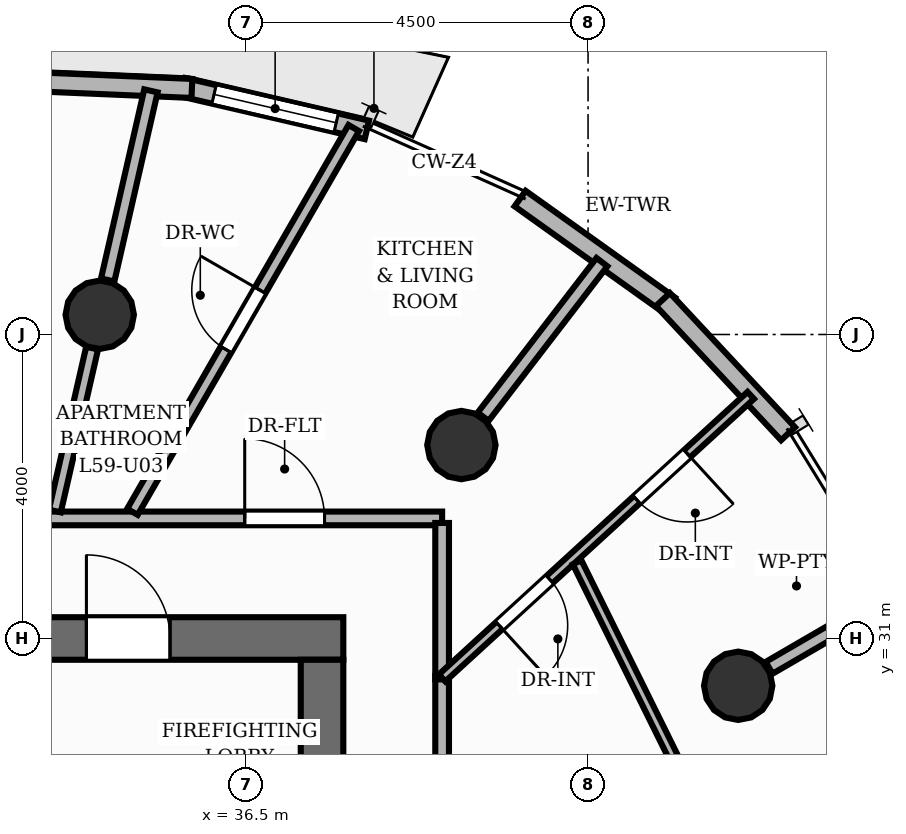
"""IFC4 building model, lengths in metres.
Left out: names, types, materials, properties, quantities, classifications, styles, units other than length and angle.
Written with IfcOpenShell. Run it as: python <this file> out.ifc"""

import sys

from ifc_helpers import new_model, si_unit, direction, frame, frame_2d, origin, origin_2d, place, context, subcontext, project, spatial, rectangle, circle, extrude, element, fill, save


model = new_model("IFC4")
c1 = context("Model", 3, precision=1e-05, world=origin(), true_north=direction((0.0, 1.0)))
c2 = subcontext(c1, "Body", "Model", "MODEL_VIEW")
j1 = project(units=[si_unit("LENGTHUNIT", "METRE"), si_unit("PLANEANGLEUNIT", "RADIAN")], contexts=[c1])
p1 = place(None, origin())
s1 = spatial("IfcSite", under=j1, at=p1, CompositionType="ELEMENT")
p2 = place(p1, origin())
s2 = spatial("IfcBuilding", under=s1, at=p2, CompositionType="ELEMENT")
p3 = place(p2, frame((0.0, 0.0, 198.24)))
s3 = spatial("IfcBuildingStorey", under=s2, at=p3, CompositionType="ELEMENT", Elevation=198.24)
p4 = place(p3, frame((26.22, 31.0, 0.0), z_axis=(0.0, 0.0, 1.0), x_axis=(1.0, 0.0, 0.0)))
e1 = element("IfcWall", 1, at=p4, inside=s3, PredefinedType="SHEAR", context=c2, shape_type="SweptSolid", body=[
    extrude(rectangle(XDim=11.56, YDim=0.56, at=frame_2d((5.78, 0.0))), origin(), (0.0, 0.0, 1.0), 3.2),
])
p5 = place(p4, frame((8.18, 0.0, 0.0)))
e2 = element("IfcOpeningElement", 2, at=p5, cuts=e1, PredefinedType="OPENING", context=c2, shape_type="SweptSolid", body=[
    extrude(rectangle(XDim=1.1, YDim=2.15, at=frame_2d((0.55, 1.075))), frame((0.0, 0.29, 0.0), z_axis=(0.0, -1.0, 0.0), x_axis=(1.0, 0.0, 0.0)), (0.0, 0.0, 1.0), 0.58),
])
p6 = place(p4, frame((0.805, 0.0, 0.0)))
e3 = element("IfcOpeningElement", 3, at=p6, cuts=e1, PredefinedType="OPENING", context=c2, shape_type="SweptSolid", body=[
    extrude(rectangle(XDim=1.05, YDim=2.15, at=frame_2d((0.525, 1.075))), frame((0.0, 0.29, 0.0), z_axis=(0.0, -1.0, 0.0), x_axis=(1.0, 0.0, 0.0)), (0.0, 0.0, 1.0), 0.58),
])
p7 = place(p4, frame((2.555, 0.0, 0.0)))
e4 = element("IfcOpeningElement", 4, at=p7, cuts=e1, PredefinedType="OPENING", context=c2, shape_type="SweptSolid", body=[
    extrude(rectangle(XDim=1.05, YDim=2.15, at=frame_2d((0.525, 1.075))), frame((0.0, 0.29, 0.0), z_axis=(0.0, -1.0, 0.0), x_axis=(1.0, 0.0, 0.0)), (0.0, 0.0, 1.0), 0.58),
])
p8 = place(p4, frame((4.305, 0.0, 0.0)))
e5 = element("IfcOpeningElement", 5, at=p8, cuts=e1, PredefinedType="OPENING", context=c2, shape_type="SweptSolid", body=[
    extrude(rectangle(XDim=1.05, YDim=2.15, at=frame_2d((0.525, 1.075))), frame((0.0, 0.29, 0.0), z_axis=(0.0, -1.0, 0.0), x_axis=(1.0, 0.0, 0.0)), (0.0, 0.0, 1.0), 0.58),
])
p9 = place(p3, frame((37.5, 17.28, 0.0), z_axis=(0.0, 0.0, 1.0), x_axis=(0.0, 1.0, 0.0)))
e6 = element("IfcWall", 6, at=p9, inside=s3, PredefinedType="SHEAR", context=c2, shape_type="SweptSolid", body=[
    extrude(rectangle(XDim=13.44, YDim=0.56, at=frame_2d((6.72, 0.0))), origin(), (0.0, 0.0, 1.0), 3.2),
])
for number, where, z_axis, x_axis in (
    (7, (42.975, 30.378, 0.0), (0.0, 0.0, 1.0), (1.0, 0.0, 0.0)),
    (8, (39.333, 33.545, 0.0), (0.0, 0.0, 1.0), (1.0, 0.0, 0.0)),
    (9, (34.575, 35.26, 0.0), (0.0, 0.0, 1.0), (1.0, 0.0, 0.0)),
):
    element("IfcColumn", number, at=place(p3, frame(where, z_axis=z_axis, x_axis=x_axis)), inside=s3, PredefinedType="COLUMN", context=c2, shape_type="SweptSolid", body=[
        extrude(circle(Radius=0.45, at=origin_2d()), origin(), (0.0, 0.0, 1.0), 3.2),
    ])
p10 = place(p3, frame((40.106, 36.788, 0.0), z_axis=(0.0, 0.0, 1.0), x_axis=(0.813794949485, -0.581152114504, 0.0)))
e10 = element("IfcWall", 10, at=p10, inside=s3, PredefinedType="SOLIDWALL", context=c2, shape_type="SweptSolid", body=[
    extrude(rectangle(XDim=2.415, YDim=0.25, at=frame_2d((1.208, 0.0))), origin(), (0.0, 0.0, 1.0), 2.96),
])
p11 = place(p3, frame((35.676, 38.253, 0.0), z_axis=(0.0, 0.0, 1.0), x_axis=(0.974096425092, -0.226133046286, 0.0)))
e11 = element("IfcWall", 11, at=p11, inside=s3, PredefinedType="SOLIDWALL", context=c2, shape_type="SweptSolid", body=[
    extrude(rectangle(XDim=2.478, YDim=0.25, at=frame_2d((1.239, 0.0))), origin(), (0.0, 0.0, 1.0), 2.96),
])
p12 = place(p11, frame((0.414, 0.0, 0.85)))
e12 = element("IfcOpeningElement", 12, at=p12, cuts=e11, PredefinedType="OPENING", context=c2, shape_type="SweptSolid", body=[
    extrude(rectangle(XDim=1.65, YDim=1.55, at=frame_2d((0.825, 0.775))), frame((0.0, 0.135, 0.0), z_axis=(0.0, -1.0, 0.0), x_axis=(1.0, 0.0, 0.0)), (0.0, 0.0, 1.0), 0.27),
])
p13 = place(p3, frame((33.258, 38.345, 0.0), z_axis=(0.0, 0.0, 1.0), x_axis=(0.999099670747, -0.042424614469, 0.0)))
e13 = element("IfcWall", 13, at=p13, inside=s3, PredefinedType="SOLIDWALL", context=c2, shape_type="SweptSolid", body=[
    extrude(rectangle(XDim=2.532, YDim=0.25, at=frame_2d((1.266, 0.0))), origin(), (0.0, 0.0, 1.0), 2.96),
])
p14 = place(p3, frame((41.985, 35.461, 0.0), z_axis=(0.0, 0.0, 1.0), x_axis=(0.681640731319, -0.731687032417, 0.0)))
e14 = element("IfcWall", 14, at=p14, inside=s3, PredefinedType="SOLIDWALL", context=c2, shape_type="SweptSolid", body=[
    extrude(rectangle(XDim=2.415, YDim=0.25, at=frame_2d((1.208, 0.0))), origin(), (0.0, 0.0, 1.0), 2.96),
])
p15 = place(p3, frame((43.382, 30.614, 0.0), z_axis=(0.0, 0.0, 1.0), x_axis=(0.864618511529, 0.502428929821, 0.0)))
e15 = element("IfcWall", 15, at=p15, inside=s3, PredefinedType="PARTITIONING", context=c2, shape_type="SweptSolid", body=[
    extrude(rectangle(XDim=1.706, YDim=0.18, at=frame_2d((0.853, 0.0))), origin(), (0.0, 0.0, 1.0), 2.403),
])
p16 = place(p3, frame((39.62, 33.918, 0.0), z_axis=(0.0, 0.0, 1.0), x_axis=(0.60921849036, 0.79300241551, 0.0)))
e16 = element("IfcWall", 16, at=p16, inside=s3, PredefinedType="PARTITIONING", context=c2, shape_type="SweptSolid", body=[
    extrude(rectangle(XDim=2.565, YDim=0.18, at=frame_2d((1.283, 0.0))), origin(), (0.0, 0.0, 1.0), 2.403),
])
p17 = place(p3, frame((34.68, 35.718, 0.0), z_axis=(0.0, 0.0, 1.0), x_axis=(0.22299363946, 0.974819899654, 0.0)))
e17 = element("IfcWall", 17, at=p17, inside=s3, PredefinedType="PARTITIONING", context=c2, shape_type="SweptSolid", body=[
    extrude(rectangle(XDim=2.552, YDim=0.18, at=frame_2d((1.276, 0.0))), origin(), (0.0, 0.0, 1.0), 2.403),
])
p18 = place(p3, frame((39.08, 30.508, 0.0), z_axis=(0.0, 0.0, 1.0), x_axis=(0.0, -1.0, 0.0)))
e18 = element("IfcWall", 18, at=p18, inside=s3, PredefinedType="PARTITIONING", context=c2, shape_type="SweptSolid", body=[
    extrude(rectangle(XDim=15.088, YDim=0.18, at=frame_2d((7.544, 0.0))), origin(), (0.0, 0.0, 1.0), 2.955),
])
p19 = place(p18, frame((7.548, 0.0, 0.0)))
e19 = element("IfcOpeningElement", 19, at=p19, cuts=e18, PredefinedType="OPENING", context=c2, shape_type="SweptSolid", body=[
    extrude(rectangle(XDim=1.05, YDim=2.15, at=frame_2d((0.525, 1.075))), frame((0.0, 0.1, 0.0), z_axis=(0.0, -1.0, 0.0), x_axis=(1.0, 0.0, 0.0)), (0.0, 0.0, 1.0), 0.2),
])
p20 = place(p3, frame((24.92, 32.58, 0.0), z_axis=(0.0, 0.0, 1.0), x_axis=(1.0, 0.0, 0.0)))
e20 = element("IfcWall", 20, at=p20, inside=s3, PredefinedType="PARTITIONING", context=c2, shape_type="SweptSolid", body=[
    extrude(rectangle(XDim=14.16, YDim=0.18, at=frame_2d((7.08, 0.0))), origin(), (0.0, 0.0, 1.0), 2.955),
])
p21 = place(p20, frame((11.563, 0.0, 0.0)))
e21 = element("IfcOpeningElement", 21, at=p21, cuts=e20, PredefinedType="OPENING", context=c2, shape_type="SweptSolid", body=[
    extrude(rectangle(XDim=1.05, YDim=2.15, at=frame_2d((0.525, 1.075))), frame((0.0, 0.1, 0.0), z_axis=(0.0, -1.0, 0.0), x_axis=(1.0, 0.0, 0.0)), (0.0, 0.0, 1.0), 0.2),
])
p22 = place(p20, frame((5.684, 0.0, 0.0)))
e22 = element("IfcOpeningElement", 22, at=p22, cuts=e20, PredefinedType="OPENING", context=c2, shape_type="SweptSolid", body=[
    extrude(rectangle(XDim=1.05, YDim=2.15, at=frame_2d((0.525, 1.075))), frame((0.0, 0.1, 0.0), z_axis=(0.0, -1.0, 0.0), x_axis=(1.0, 0.0, 0.0)), (0.0, 0.0, 1.0), 0.2),
])
p23 = place(p3, frame((39.08, 32.52, 0.0), z_axis=(0.0, 0.0, 1.0), x_axis=(0.0, -1.0, 0.0)))
e23 = element("IfcWall", 23, at=p23, inside=s3, PredefinedType="PARTITIONING", context=c2, shape_type="SweptSolid", body=[
    extrude(rectangle(XDim=2.059, YDim=0.18, at=frame_2d((1.029, 0.0))), origin(), (0.0, 0.0, 1.0), 2.955),
])
p24 = place(p3, frame((35.005, 32.667, 0.0), z_axis=(0.0, 0.0, 1.0), x_axis=(0.499495237235, 0.866316632635, 0.0)))
e24 = element("IfcWall", 24, at=p24, inside=s3, PredefinedType="PLUMBINGWALL", context=c2, shape_type="SweptSolid", body=[
    extrude(rectangle(XDim=5.83, YDim=0.16, at=frame_2d((2.915, 0.0))), origin(), (0.0, 0.0, 1.0), 2.692),
])
p25 = place(p24, frame((2.465, 0.0, 0.0)))
e25 = element("IfcOpeningElement", 25, at=p25, cuts=e24, PredefinedType="OPENING", context=c2, shape_type="SweptSolid", body=[
    extrude(rectangle(XDim=0.9, YDim=2.1, at=frame_2d((0.45, 1.05))), frame((0.0, 0.09, 0.0), z_axis=(0.0, -1.0, 0.0), x_axis=(1.0, 0.0, 0.0)), (0.0, 0.0, 1.0), 0.18),
])
p26 = place(p3, frame((43.14, 34.198, 0.0), z_axis=(0.0, 0.0, 1.0), x_axis=(-0.737575567473, -0.675264601668, 0.0)))
e26 = element("IfcWall", 26, at=p26, inside=s3, PredefinedType="PARTITIONING", context=c2, shape_type="SweptSolid", body=[
    extrude(rectangle(XDim=5.505, YDim=0.125, at=frame_2d((2.752, 0.0))), origin(), (0.0, 0.0, 1.0), 2.955),
])
p27 = place(p26, frame((1.133, 0.0, 0.0)))
e27 = element("IfcOpeningElement", 27, at=p27, cuts=e26, PredefinedType="OPENING", context=c2, shape_type="SweptSolid", body=[
    extrude(rectangle(XDim=0.9, YDim=2.1, at=frame_2d((0.45, 1.05))), frame((0.0, 0.073, 0.0), z_axis=(0.0, -1.0, 0.0), x_axis=(1.0, 0.0, 0.0)), (0.0, 0.0, 1.0), 0.145),
])
p28 = place(p26, frame((3.585, 0.0, 0.0)))
e28 = element("IfcOpeningElement", 28, at=p28, cuts=e26, PredefinedType="OPENING", context=c2, shape_type="SweptSolid", body=[
    extrude(rectangle(XDim=0.9, YDim=2.1, at=frame_2d((0.45, 1.05))), frame((0.0, 0.073, 0.0), z_axis=(0.0, -1.0, 0.0), x_axis=(1.0, 0.0, 0.0)), (0.0, 0.0, 1.0), 0.145),
])
p29 = place(p3, frame((33.985, 32.677, 0.0), z_axis=(0.0, 0.0, 1.0), x_axis=(0.222969522248, 0.974825416241, 0.0)))
e29 = element("IfcWall", 29, at=p29, inside=s3, PredefinedType="PLUMBINGWALL", context=c2, shape_type="SweptSolid", body=[
    extrude(rectangle(XDim=2.199, YDim=0.16, at=frame_2d((1.099, 0.0))), origin(), (0.0, 0.0, 1.0), 2.403),
])
p30 = place(p3, frame((43.767, 26.113, 0.0), z_axis=(0.0, 0.0, 1.0), x_axis=(-0.443135854585, 0.89645446866, 0.0)))
e30 = element("IfcWall", 30, at=p30, inside=s3, PredefinedType="PARTITIONING", context=c2, shape_type="SweptSolid", body=[
    extrude(rectangle(XDim=6.569, YDim=0.125, at=frame_2d((3.285, 0.0))), origin(), (0.0, 0.0, 1.0), 2.488),
])
p31 = place(p12, origin())
e31 = element("IfcWindow", 31, at=p31, inside=s3, PartitioningType="SINGLE_PANEL", PredefinedType="WINDOW", context=c2, shape_type="SweptSolid", body=[
    extrude(rectangle(XDim=1.65, YDim=1.55, at=frame_2d((0.825, 0.775))), frame((0.0, 0.03, 0.0), z_axis=(0.0, -1.0, 0.0), x_axis=(1.0, 0.0, 0.0)), (0.0, 0.0, 1.0), 0.06),
])
fill(e12, e31)
p32 = place(p5, origin())
e32 = element("IfcDoor", 32, at=p32, inside=s3, OperationType="SINGLE_SWING_LEFT", PredefinedType="DOOR", context=c2, shape_type="SweptSolid", body=[
    extrude(rectangle(XDim=1.1, YDim=2.15, at=frame_2d((0.55, 1.075))), frame((0.0, 0.025, 0.0), z_axis=(0.0, -1.0, 0.0), x_axis=(1.0, 0.0, 0.0)), (0.0, 0.0, 1.0), 0.05),
])
fill(e2, e32)
p33 = place(p21, origin())
e33 = element("IfcDoor", 33, at=p33, inside=s3, OperationType="SINGLE_SWING_LEFT", PredefinedType="DOOR", context=c2, shape_type="SweptSolid", body=[
    extrude(rectangle(XDim=1.05, YDim=2.15, at=frame_2d((0.525, 1.075))), frame((0.0, 0.025, 0.0), z_axis=(0.0, -1.0, 0.0), x_axis=(1.0, 0.0, 0.0)), (0.0, 0.0, 1.0), 0.05),
])
fill(e21, e33)
p34 = place(p25, origin())
e34 = element("IfcDoor", 34, at=p34, inside=s3, OperationType="SINGLE_SWING_RIGHT", PredefinedType="DOOR", context=c2, shape_type="SweptSolid", body=[
    extrude(rectangle(XDim=0.9, YDim=2.1, at=frame_2d((0.45, 1.05))), frame((0.0, 0.025, 0.0), z_axis=(0.0, -1.0, 0.0), x_axis=(1.0, 0.0, 0.0)), (0.0, 0.0, 1.0), 0.05),
])
fill(e25, e34)
p35 = place(p27, origin())
e35 = element("IfcDoor", 35, at=p35, inside=s3, OperationType="SINGLE_SWING_LEFT", PredefinedType="DOOR", context=c2, shape_type="SweptSolid", body=[
    extrude(rectangle(XDim=0.9, YDim=2.1, at=frame_2d((0.45, 1.05))), frame((0.0, 0.025, 0.0), z_axis=(0.0, -1.0, 0.0), x_axis=(1.0, 0.0, 0.0)), (0.0, 0.0, 1.0), 0.05),
])
fill(e27, e35)
p36 = place(p28, origin())
e36 = element("IfcDoor", 36, at=p36, inside=s3, OperationType="SINGLE_SWING_RIGHT", PredefinedType="DOOR", context=c2, shape_type="SweptSolid", body=[
    extrude(rectangle(XDim=0.9, YDim=2.1, at=frame_2d((0.45, 1.05))), frame((0.0, 0.025, 0.0), z_axis=(0.0, -1.0, 0.0), x_axis=(1.0, 0.0, 0.0)), (0.0, 0.0, 1.0), 0.05),
])
fill(e28, e36)
save(model, sys.argv[1])
